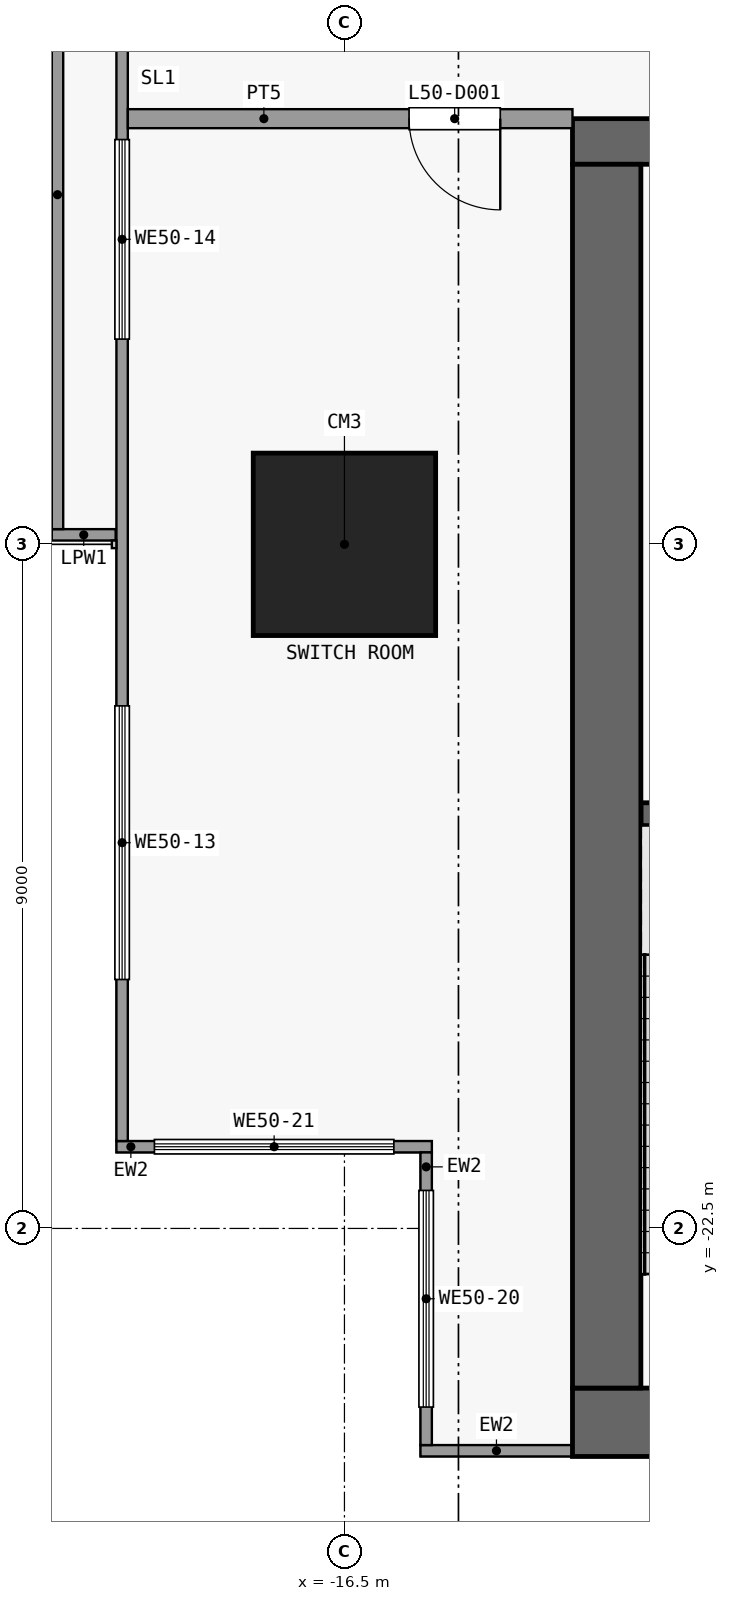
"""IFC4 building model, lengths in metres.
Left out: names, types, materials, properties, quantities, classifications, styles, units other than length and angle.
Written with IfcOpenShell. Run it as: python <this file> out.ifc"""

import sys

from ifc_helpers import new_model, si_unit, direction, frame, frame_2d, origin, origin_2d, place, context, subcontext, project, spatial, rectangle, extrude, element, fill, save


model = new_model("IFC4")
c1 = context("Model", 3, precision=1e-05, world=origin(), true_north=direction((0.0, 1.0)))
c2 = subcontext(c1, "Body", "Model", "MODEL_VIEW")
j1 = project(units=[si_unit("LENGTHUNIT", "METRE"), si_unit("PLANEANGLEUNIT", "RADIAN")], contexts=[c1])
p1 = place(None, origin())
s1 = spatial("IfcSite", under=j1, at=p1, CompositionType="ELEMENT")
p2 = place(p1, origin())
s2 = spatial("IfcBuilding", under=s1, at=p2, CompositionType="ELEMENT")
p3 = place(p2, frame((0.0, 0.0, 199.7)))
s3 = spatial("IfcBuildingStorey", under=s2, at=p3, CompositionType="ELEMENT", Elevation=199.7)
p4 = place(p3, frame((-16.5, -13.5, 0.0), z_axis=(0.0, 0.0, 1.0), x_axis=(1.0, 0.0, 0.0)))
e1 = element("IfcColumn", 1, at=p4, inside=s3, PredefinedType="COLUMN", context=c2, shape_type="SweptSolid", body=[
    extrude(rectangle(XDim=2.4, YDim=2.4, at=origin_2d()), origin(), (0.0, 0.0, 1.0), 5.4),
])
p5 = place(p3, frame((-13.5, -25.05, 0.0), z_axis=(0.0, 0.0, 1.0), x_axis=(1.0, 0.0, 0.0)))
e2 = element("IfcWall", 2, at=p5, inside=s3, PredefinedType="SHEAR", context=c2, shape_type="SweptSolid", body=[
    extrude(rectangle(XDim=27.0, YDim=0.9, at=frame_2d((13.5, 0.0))), origin(), (0.0, 0.0, 1.0), 5.0),
])
p6 = place(p3, frame((-13.5, -8.2, 0.0), z_axis=(0.0, 0.0, 1.0), x_axis=(1.0, 0.0, 0.0)))
e3 = element("IfcWall", 3, at=p6, inside=s3, PredefinedType="SHEAR", context=c2, shape_type="SweptSolid", body=[
    extrude(rectangle(XDim=27.0, YDim=0.6, at=frame_2d((13.5, 0.0))), origin(), (0.0, 0.0, 1.0), 5.0),
])
p7 = place(p6, frame((7.8, 0.0, 0.0)))
e4 = element("IfcOpeningElement", 4, at=p7, cuts=e3, PredefinedType="OPENING", context=c2, shape_type="SweptSolid", body=[
    extrude(rectangle(XDim=1.8, YDim=2.1, at=frame_2d((0.9, 1.05))), frame((0.0, 0.31, 0.0), z_axis=(0.0, -1.0, 0.0), x_axis=(1.0, 0.0, 0.0)), (0.0, 0.0, 1.0), 0.62),
])
p8 = place(p6, frame((17.4, 0.0, 0.0)))
e5 = element("IfcOpeningElement", 5, at=p8, cuts=e3, PredefinedType="OPENING", context=c2, shape_type="SweptSolid", body=[
    extrude(rectangle(XDim=1.8, YDim=2.1, at=frame_2d((0.9, 1.05))), frame((0.0, 0.31, 0.0), z_axis=(0.0, -1.0, 0.0), x_axis=(1.0, 0.0, 0.0)), (0.0, 0.0, 1.0), 0.62),
])
p9 = place(p6, frame((1.725, 0.0, 0.0)))
e6 = element("IfcOpeningElement", 6, at=p9, cuts=e3, PredefinedType="OPENING", context=c2, shape_type="SweptSolid", body=[
    extrude(rectangle(XDim=1.2, YDim=2.1, at=frame_2d((0.6, 1.05))), frame((0.0, 0.31, 0.0), z_axis=(0.0, -1.0, 0.0), x_axis=(1.0, 0.0, 0.0)), (0.0, 0.0, 1.0), 0.62),
])
p10 = place(p6, frame((23.375, 0.0, 0.0)))
e7 = element("IfcOpeningElement", 7, at=p10, cuts=e3, PredefinedType="OPENING", context=c2, shape_type="SweptSolid", body=[
    extrude(rectangle(XDim=0.9, YDim=2.1, at=frame_2d((0.45, 1.05))), frame((0.0, 0.31, 0.0), z_axis=(0.0, -1.0, 0.0), x_axis=(1.0, 0.0, 0.0)), (0.0, 0.0, 1.0), 0.62),
])
p11 = place(p3, frame((-13.05, -24.6, 0.0), z_axis=(0.0, 0.0, 1.0), x_axis=(0.0, 1.0, 0.0)))
e8 = element("IfcWall", 8, at=p11, inside=s3, PredefinedType="SHEAR", context=c2, shape_type="SweptSolid", body=[
    extrude(rectangle(XDim=16.1, YDim=0.9, at=frame_2d((8.05, 0.0))), origin(), (0.0, 0.0, 1.0), 5.0),
])
p12 = place(p3, frame((-12.6, -17.05, 0.0), z_axis=(0.0, 0.0, 1.0), x_axis=(1.0, 0.0, 0.0)))
e9 = element("IfcWall", 9, at=p12, inside=s3, PredefinedType="SHEAR", context=c2, shape_type="SweptSolid", body=[
    extrude(rectangle(XDim=3.1, YDim=0.3, at=frame_2d((1.55, 0.0))), origin(), (0.0, 0.0, 1.0), 5.0),
])
p13 = place(p3, frame((-13.5, -25.425, 0.0), z_axis=(0.0, 0.0, 1.0), x_axis=(-1.0, 0.0, 0.0)))
e10 = element("IfcWall", 10, at=p13, inside=s3, PredefinedType="SOLIDWALL", context=c2, shape_type="SweptSolid", body=[
    extrude(rectangle(XDim=2.0, YDim=0.15, at=frame_2d((1.0, 0.0))), origin(), (0.0, 0.0, 1.0), 5.0),
])
p14 = place(p3, frame((-19.425, -21.35, 0.0), z_axis=(0.0, 0.0, 1.0), x_axis=(0.0, 1.0, 0.0)))
e11 = element("IfcWall", 11, at=p14, inside=s3, PredefinedType="SOLIDWALL", context=c2, shape_type="SweptSolid", body=[
    extrude(rectangle(XDim=39.7, YDim=0.15, at=frame_2d((19.85, 0.0))), origin(), (0.0, 0.0, 1.0), 5.0),
])
p15 = place(p14, frame((2.125, 0.0, 1.2)))
e12 = element("IfcOpeningElement", 12, at=p15, cuts=e11, PredefinedType="OPENING", context=c2, shape_type="SweptSolid", body=[
    extrude(rectangle(XDim=3.6, YDim=3.0, at=frame_2d((1.8, 1.5))), frame((0.0, 0.085, 0.0), z_axis=(0.0, -1.0, 0.0), x_axis=(1.0, 0.0, 0.0)), (0.0, 0.0, 1.0), 0.17),
])
p16 = place(p14, frame((10.55, 0.0, 1.2)))
e13 = element("IfcOpeningElement", 13, at=p16, cuts=e11, PredefinedType="OPENING", context=c2, shape_type="SweptSolid", body=[
    extrude(rectangle(XDim=2.625, YDim=3.0, at=frame_2d((1.312, 1.5))), frame((0.0, 0.085, 0.0), z_axis=(0.0, -1.0, 0.0), x_axis=(1.0, 0.0, 0.0)), (0.0, 0.0, 1.0), 0.17),
])
p17 = place(p14, frame((18.05, 0.0, 1.2)))
e14 = element("IfcOpeningElement", 14, at=p17, cuts=e11, PredefinedType="OPENING", context=c2, shape_type="SweptSolid", body=[
    extrude(rectangle(XDim=3.6, YDim=3.0, at=frame_2d((1.8, 1.5))), frame((0.0, 0.085, 0.0), z_axis=(0.0, -1.0, 0.0), x_axis=(1.0, 0.0, 0.0)), (0.0, 0.0, 1.0), 0.17),
])
p18 = place(p14, frame((24.05, 0.0, 1.2)))
e15 = element("IfcOpeningElement", 15, at=p18, cuts=e11, PredefinedType="OPENING", context=c2, shape_type="SweptSolid", body=[
    extrude(rectangle(XDim=3.6, YDim=3.0, at=frame_2d((1.8, 1.5))), frame((0.0, 0.085, 0.0), z_axis=(0.0, -1.0, 0.0), x_axis=(1.0, 0.0, 0.0)), (0.0, 0.0, 1.0), 0.17),
])
p19 = place(p14, frame((30.05, 0.0, 1.2)))
e16 = element("IfcOpeningElement", 16, at=p19, cuts=e11, PredefinedType="OPENING", context=c2, shape_type="SweptSolid", body=[
    extrude(rectangle(XDim=1.525, YDim=3.0, at=frame_2d((0.762, 1.5))), frame((0.0, 0.085, 0.0), z_axis=(0.0, -1.0, 0.0), x_axis=(1.0, 0.0, 0.0)), (0.0, 0.0, 1.0), 0.17),
])
p20 = place(p14, frame((32.125, 0.0, 1.2)))
e17 = element("IfcOpeningElement", 17, at=p20, cuts=e11, PredefinedType="OPENING", context=c2, shape_type="SweptSolid", body=[
    extrude(rectangle(XDim=1.525, YDim=3.0, at=frame_2d((0.762, 1.5))), frame((0.0, 0.085, 0.0), z_axis=(0.0, -1.0, 0.0), x_axis=(1.0, 0.0, 0.0)), (0.0, 0.0, 1.0), 0.17),
])
p21 = place(p14, frame((35.475, 0.0, 1.2)))
e18 = element("IfcOpeningElement", 18, at=p21, cuts=e11, PredefinedType="OPENING", context=c2, shape_type="SweptSolid", body=[
    extrude(rectangle(XDim=3.6, YDim=3.0, at=frame_2d((1.8, 1.5))), frame((0.0, 0.085, 0.0), z_axis=(0.0, -1.0, 0.0), x_axis=(1.0, 0.0, 0.0)), (0.0, 0.0, 1.0), 0.17),
])
p22 = place(p3, frame((-15.425, -25.35, 0.0), z_axis=(0.0, 0.0, 1.0), x_axis=(0.0, 1.0, 0.0)))
e19 = element("IfcWall", 19, at=p22, inside=s3, PredefinedType="SOLIDWALL", context=c2, shape_type="SweptSolid", body=[
    extrude(rectangle(XDim=3.85, YDim=0.15, at=frame_2d((1.925, 0.0))), origin(), (0.0, 0.0, 1.0), 5.0),
])
p23 = place(p22, frame((0.5, 0.0, 1.2)))
e20 = element("IfcOpeningElement", 20, at=p23, cuts=e19, PredefinedType="OPENING", context=c2, shape_type="SweptSolid", body=[
    extrude(rectangle(XDim=2.85, YDim=3.0, at=frame_2d((1.425, 1.5))), frame((0.0, 0.085, 0.0), z_axis=(0.0, -1.0, 0.0), x_axis=(1.0, 0.0, 0.0)), (0.0, 0.0, 1.0), 0.17),
])
p24 = place(p3, frame((-15.35, -21.425, 0.0), z_axis=(0.0, 0.0, 1.0), x_axis=(-1.0, 0.0, 0.0)))
e21 = element("IfcWall", 21, at=p24, inside=s3, PredefinedType="SOLIDWALL", context=c2, shape_type="SweptSolid", body=[
    extrude(rectangle(XDim=4.15, YDim=0.15, at=frame_2d((2.075, 0.0))), origin(), (0.0, 0.0, 1.0), 5.0),
])
p25 = place(p24, frame((0.5, 0.0, 1.2)))
e22 = element("IfcOpeningElement", 22, at=p25, cuts=e21, PredefinedType="OPENING", context=c2, shape_type="SweptSolid", body=[
    extrude(rectangle(XDim=3.15, YDim=3.0, at=frame_2d((1.575, 1.5))), frame((0.0, 0.085, 0.0), z_axis=(0.0, -1.0, 0.0), x_axis=(1.0, 0.0, 0.0)), (0.0, 0.0, 1.0), 0.17),
])
p26 = place(p3, frame((-19.51, -13.375, 0.0), z_axis=(0.0, 0.0, 1.0), x_axis=(-1.0, 0.0, 0.0)))
e23 = element("IfcWall", 23, at=p26, inside=s3, PredefinedType="PARAPET", context=c2, shape_type="SweptSolid", body=[
    extrude(rectangle(XDim=0.84, YDim=0.15, at=frame_2d((0.42, 0.0))), origin(), (0.0, 0.0, 1.0), 1.15),
])
p27 = place(p3, frame((-20.275, -13.3, 0.0), z_axis=(0.0, 0.0, 1.0), x_axis=(0.0, 1.0, 0.0)))
e24 = element("IfcWall", 24, at=p27, inside=s3, PredefinedType="PARAPET", context=c2, shape_type="SweptSolid", body=[
    extrude(rectangle(XDim=8.8, YDim=0.15, at=frame_2d((4.4, 0.0))), origin(), (0.0, 0.0, 1.0), 1.15),
])
p28 = place(p3, frame((-19.35, -7.9, 0.0), z_axis=(0.0, 0.0, 1.0), x_axis=(1.0, 0.0, 0.0)))
e25 = element("IfcWall", 25, at=p28, inside=s3, PredefinedType="PARTITIONING", context=c2, shape_type="SweptSolid", body=[
    extrude(rectangle(XDim=5.85, YDim=0.25, at=frame_2d((2.925, 0.0))), origin(), (0.0, 0.0, 1.0), 5.0),
])
p29 = place(p28, frame((3.7, 0.0, 0.0)))
e26 = element("IfcOpeningElement", 26, at=p29, cuts=e25, PredefinedType="OPENING", context=c2, shape_type="SweptSolid", body=[
    extrude(rectangle(XDim=1.2, YDim=2.1, at=frame_2d((0.6, 1.05))), frame((0.0, 0.135, 0.0), z_axis=(0.0, -1.0, 0.0), x_axis=(1.0, 0.0, 0.0)), (0.0, 0.0, 1.0), 0.27),
])
p30 = place(p15, origin())
e27 = element("IfcWindow", 27, at=p30, inside=s3, PartitioningType="SINGLE_PANEL", PredefinedType="WINDOW", context=c2, shape_type="SweptSolid", body=[
    extrude(rectangle(XDim=3.6, YDim=3.0, at=frame_2d((1.8, 1.5))), frame((0.0, 0.03, 0.0), z_axis=(0.0, -1.0, 0.0), x_axis=(1.0, 0.0, 0.0)), (0.0, 0.0, 1.0), 0.06),
])
fill(e12, e27)
p31 = place(p16, origin())
e28 = element("IfcWindow", 28, at=p31, inside=s3, PartitioningType="SINGLE_PANEL", PredefinedType="WINDOW", context=c2, shape_type="SweptSolid", body=[
    extrude(rectangle(XDim=2.625, YDim=3.0, at=frame_2d((1.312, 1.5))), frame((0.0, 0.03, 0.0), z_axis=(0.0, -1.0, 0.0), x_axis=(1.0, 0.0, 0.0)), (0.0, 0.0, 1.0), 0.06),
])
fill(e13, e28)
p32 = place(p23, origin())
e29 = element("IfcWindow", 29, at=p32, inside=s3, PartitioningType="SINGLE_PANEL", PredefinedType="WINDOW", context=c2, shape_type="SweptSolid", body=[
    extrude(rectangle(XDim=2.85, YDim=3.0, at=frame_2d((1.425, 1.5))), frame((0.0, 0.03, 0.0), z_axis=(0.0, -1.0, 0.0), x_axis=(1.0, 0.0, 0.0)), (0.0, 0.0, 1.0), 0.06),
])
fill(e20, e29)
p33 = place(p25, origin())
e30 = element("IfcWindow", 30, at=p33, inside=s3, PartitioningType="SINGLE_PANEL", PredefinedType="WINDOW", context=c2, shape_type="SweptSolid", body=[
    extrude(rectangle(XDim=3.15, YDim=3.0, at=frame_2d((1.575, 1.5))), frame((0.0, 0.03, 0.0), z_axis=(0.0, -1.0, 0.0), x_axis=(1.0, 0.0, 0.0)), (0.0, 0.0, 1.0), 0.06),
])
fill(e22, e30)
p34 = place(p29, origin())
e31 = element("IfcDoor", 31, at=p34, inside=s3, OperationType="SINGLE_SWING_RIGHT", PredefinedType="DOOR", context=c2, shape_type="SweptSolid", body=[
    extrude(rectangle(XDim=1.2, YDim=2.1, at=frame_2d((0.6, 1.05))), frame((0.0, 0.025, 0.0), z_axis=(0.0, -1.0, 0.0), x_axis=(1.0, 0.0, 0.0)), (0.0, 0.0, 1.0), 0.05),
])
fill(e26, e31)
save(model, sys.argv[1])
